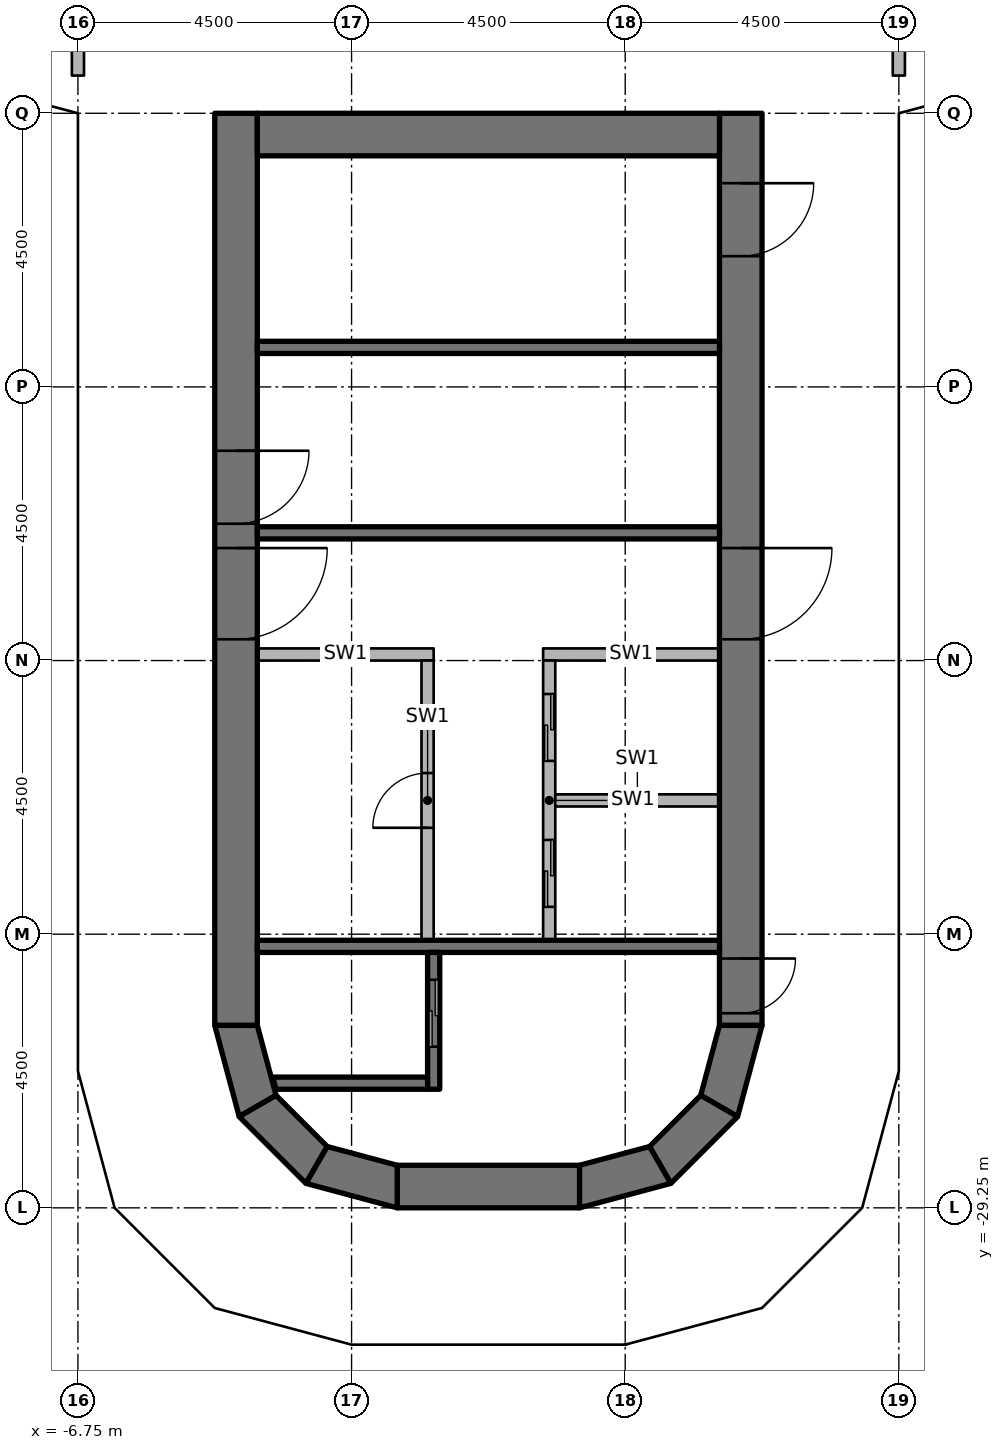
"""IFC4 building model, lengths in metres.
Left out: names, types, materials, properties, quantities, classifications, styles, units other than length and angle.
Written with IfcOpenShell. Run it as: python <this file> out.ifc"""

import sys

from ifc_helpers import new_model, si_unit, direction, frame, frame_2d, origin, origin_2d, place, context, subcontext, project, spatial, polyline, rectangle, outline, extrude, element, fill, save


model = new_model("IFC4")
c1 = context("Model", 3, precision=1e-05, world=origin(), true_north=direction((0.0, 1.0)))
c2 = subcontext(c1, "Body", "Model", "MODEL_VIEW")
j1 = project(units=[si_unit("LENGTHUNIT", "METRE"), si_unit("PLANEANGLEUNIT", "RADIAN")], contexts=[c1])
p1 = place(None, origin())
s1 = spatial("IfcSite", under=j1, at=p1, CompositionType="ELEMENT")
p2 = place(p1, origin())
s2 = spatial("IfcBuilding", under=s1, at=p2, CompositionType="ELEMENT")
p3 = place(p2, frame((0.0, 0.0, 186.6)))
s3 = spatial("IfcBuildingStorey", under=s2, at=p3, CompositionType="ELEMENT", Elevation=186.6)
for number, where, z_axis, x_axis in (
    (1, (-6.25, -26.9, 0.0), (0.0, 0.0, 1.0), (1.0, 0.0, 0.0)),
    (2, (-6.25, -24.65, 0.0), (0.0, 0.0, 1.0), (1.0, 0.0, 0.0)),
    (3, (-6.25, -20.25, 0.0), (0.0, 0.0, 1.0), (1.0, 0.0, 0.0)),
    (4, (-6.25, -15.75, 0.0), (0.0, 0.0, 1.0), (1.0, 0.0, 0.0)),
    (5, (-6.25, -10.75, 0.0), (0.0, 0.0, 1.0), (1.0, 0.0, 0.0)),
    (6, (6.25, -26.9, 0.0), (0.0, 0.0, 1.0), (1.0, 0.0, 0.0)),
    (7, (6.25, -24.65, 0.0), (0.0, 0.0, 1.0), (1.0, 0.0, 0.0)),
    (8, (6.25, -20.25, 0.0), (0.0, 0.0, 1.0), (1.0, 0.0, 0.0)),
    (9, (6.25, -15.75, 0.0), (0.0, 0.0, 1.0), (1.0, 0.0, 0.0)),
    (10, (6.25, -10.75, 0.0), (0.0, 0.0, 1.0), (1.0, 0.0, 0.0)),
):
    element("IfcColumn", number, at=place(p3, frame(where, z_axis=z_axis, x_axis=x_axis)), inside=s3, PredefinedType="COLUMN", context=c2, shape_type="SweptSolid", body=[
        extrude(rectangle(XDim=0.8, YDim=0.8, at=origin_2d()), origin(), (0.0, 0.0, 1.0), 3.65),
    ])
p4 = place(p3, frame((-4.15, -11.25, 0.0), z_axis=(0.0, 0.0, 1.0), x_axis=(0.0, -1.0, 0.0)))
e11 = element("IfcWall", 11, at=p4, inside=s3, PredefinedType="SHEAR", context=c2, shape_type="SweptSolid", body=[
    extrude(rectangle(XDim=15.0, YDim=0.7, at=frame_2d((7.5, 0.0))), origin(), (0.0, 0.0, 1.0), 3.8),
])
p5 = place(p4, frame((7.15, 0.0, 0.0)))
e12 = element("IfcOpeningElement", 12, at=p5, cuts=e11, PredefinedType="OPENING", context=c2, shape_type="SweptSolid", body=[
    extrude(rectangle(XDim=1.5, YDim=2.3, at=frame_2d((0.75, 1.15))), frame((0.0, 0.36, 0.0), z_axis=(0.0, -1.0, 0.0), x_axis=(1.0, 0.0, 0.0)), (0.0, 0.0, 1.0), 0.72),
])
p6 = place(p4, frame((5.55, 0.0, 0.0)))
e13 = element("IfcOpeningElement", 13, at=p6, cuts=e11, PredefinedType="OPENING", context=c2, shape_type="SweptSolid", body=[
    extrude(rectangle(XDim=1.2, YDim=2.1, at=frame_2d((0.6, 1.05))), frame((0.0, 0.36, 0.0), z_axis=(0.0, -1.0, 0.0), x_axis=(1.0, 0.0, 0.0)), (0.0, 0.0, 1.0), 0.72),
])
p7 = place(p3, frame((4.15, -11.25, 0.0), z_axis=(0.0, 0.0, 1.0), x_axis=(0.0, -1.0, 0.0)))
e14 = element("IfcWall", 14, at=p7, inside=s3, PredefinedType="SHEAR", context=c2, shape_type="SweptSolid", body=[
    extrude(rectangle(XDim=15.0, YDim=0.7, at=frame_2d((7.5, 0.0))), origin(), (0.0, 0.0, 1.0), 3.8),
])
p8 = place(p7, frame((7.15, 0.0, 0.0)))
e15 = element("IfcOpeningElement", 15, at=p8, cuts=e14, PredefinedType="OPENING", context=c2, shape_type="SweptSolid", body=[
    extrude(rectangle(XDim=1.5, YDim=2.3, at=frame_2d((0.75, 1.15))), frame((0.0, 0.36, 0.0), z_axis=(0.0, -1.0, 0.0), x_axis=(1.0, 0.0, 0.0)), (0.0, 0.0, 1.0), 0.72),
])
p9 = place(p7, frame((13.9, 0.0, 0.0)))
e16 = element("IfcOpeningElement", 16, at=p9, cuts=e14, PredefinedType="OPENING", context=c2, shape_type="SweptSolid", body=[
    extrude(rectangle(XDim=0.9, YDim=2.1, at=frame_2d((0.45, 1.05))), frame((0.0, 0.36, 0.0), z_axis=(0.0, -1.0, 0.0), x_axis=(1.0, 0.0, 0.0)), (0.0, 0.0, 1.0), 0.72),
])
p10 = place(p7, frame((1.15, 0.0, 0.0)))
e17 = element("IfcOpeningElement", 17, at=p10, cuts=e14, PredefinedType="OPENING", context=c2, shape_type="SweptSolid", body=[
    extrude(rectangle(XDim=1.2, YDim=2.1, at=frame_2d((0.6, 1.05))), frame((0.0, 0.36, 0.0), z_axis=(0.0, -1.0, 0.0), x_axis=(1.0, 0.0, 0.0)), (0.0, 0.0, 1.0), 0.72),
])
p11 = place(p3, frame((-3.8, -11.6, 0.0), z_axis=(0.0, 0.0, 1.0), x_axis=(1.0, 0.0, 0.0)))
e18 = element("IfcWall", 18, at=p11, inside=s3, PredefinedType="SHEAR", context=c2, shape_type="SweptSolid", body=[
    extrude(rectangle(XDim=7.6, YDim=0.7, at=frame_2d((3.8, 0.0))), origin(), (0.0, 0.0, 1.0), 3.8),
])
p12 = place(p3, frame((-1.5, -28.9, 0.0), z_axis=(0.0, 0.0, 1.0), x_axis=(1.0, 0.0, 0.0)))
e19 = element("IfcWall", 19, at=p12, inside=s3, PredefinedType="SHEAR", context=c2, shape_type="SweptSolid", body=[
    extrude(rectangle(XDim=3.0, YDim=0.7, at=frame_2d((1.5, 0.0))), origin(), (0.0, 0.0, 1.0), 3.8),
])
p13 = place(p3, origin())
e20 = element("IfcWall", 20, at=p13, inside=s3, PredefinedType="SHEAR", context=c2, shape_type="SweptSolid", body=[
    extrude(outline(polyline([(-4.5, -26.25), (-4.098, -27.75), (-3.492, -27.4), (-3.8, -26.25), (-4.5, -26.25)])), origin(), (0.0, 0.0, 1.0), 3.8),
])
p14 = place(p3, origin())
e21 = element("IfcWall", 21, at=p14, inside=s3, PredefinedType="SHEAR", context=c2, shape_type="SweptSolid", body=[
    extrude(outline(polyline([(-4.098, -27.75), (-3.0, -28.848), (-2.65, -28.242), (-3.492, -27.4), (-4.098, -27.75)])), origin(), (0.0, 0.0, 1.0), 3.8),
])
p15 = place(p3, origin())
e22 = element("IfcWall", 22, at=p15, inside=s3, PredefinedType="SHEAR", context=c2, shape_type="SweptSolid", body=[
    extrude(outline(polyline([(-3.0, -28.848), (-1.5, -29.25), (-1.5, -28.55), (-2.65, -28.242), (-3.0, -28.848)])), origin(), (0.0, 0.0, 1.0), 3.8),
])
p16 = place(p3, origin())
e23 = element("IfcWall", 23, at=p16, inside=s3, PredefinedType="SHEAR", context=c2, shape_type="SweptSolid", body=[
    extrude(outline(polyline([(4.5, -26.25), (4.098, -27.75), (3.492, -27.4), (3.8, -26.25), (4.5, -26.25)])), origin(), (0.0, 0.0, 1.0), 3.8),
])
p17 = place(p3, origin())
e24 = element("IfcWall", 24, at=p17, inside=s3, PredefinedType="SHEAR", context=c2, shape_type="SweptSolid", body=[
    extrude(outline(polyline([(4.098, -27.75), (3.0, -28.848), (2.65, -28.242), (3.492, -27.4), (4.098, -27.75)])), origin(), (0.0, 0.0, 1.0), 3.8),
])
p18 = place(p3, origin())
e25 = element("IfcWall", 25, at=p18, inside=s3, PredefinedType="SHEAR", context=c2, shape_type="SweptSolid", body=[
    extrude(outline(polyline([(3.0, -28.848), (1.5, -29.25), (1.5, -28.55), (2.65, -28.242), (3.0, -28.848)])), origin(), (0.0, 0.0, 1.0), 3.8),
])
p19 = place(p3, frame((3.8, -24.95, 0.0), z_axis=(0.0, 0.0, 1.0), x_axis=(-1.0, 0.0, 0.0)))
e26 = element("IfcWall", 26, at=p19, inside=s3, PredefinedType="SHEAR", context=c2, shape_type="SweptSolid", body=[
    extrude(rectangle(XDim=7.6, YDim=0.2, at=frame_2d((3.8, 0.0))), origin(), (0.0, 0.0, 1.0), 3.65),
])
p20 = place(p3, frame((-0.9, -27.3, 0.0), z_axis=(0.0, 0.0, 1.0), x_axis=(0.0, 1.0, 0.0)))
e27 = element("IfcWall", 27, at=p20, inside=s3, PredefinedType="SHEAR", context=c2, shape_type="SweptSolid", body=[
    extrude(rectangle(XDim=2.25, YDim=0.2, at=frame_2d((1.125, 0.0))), origin(), (0.0, 0.0, 1.0), 3.65),
])
p21 = place(p20, frame((0.7, 0.0, 0.0)))
e28 = element("IfcOpeningElement", 28, at=p21, cuts=e27, PredefinedType="OPENING", context=c2, shape_type="SweptSolid", body=[
    extrude(rectangle(XDim=1.1, YDim=2.3, at=frame_2d((0.55, 1.15))), frame((0.0, 0.11, 0.0), z_axis=(0.0, -1.0, 0.0), x_axis=(1.0, 0.0, 0.0)), (0.0, 0.0, 1.0), 0.22),
])
p22 = place(p3, origin())
e29 = element("IfcWall", 29, at=p22, inside=s3, PredefinedType="SHEAR", context=c2, shape_type="SweptSolid", body=[
    extrude(outline(polyline([(-1.0, -27.1), (-3.548, -27.1), (-3.494, -27.3), (-1.0, -27.3), (-1.0, -27.1)])), origin(), (0.0, 0.0, 1.0), 3.65),
])
for number, where, z_axis, x_axis in (
    (30, (3.8, -18.15, 0.0), (0.0, 0.0, 1.0), (-1.0, 0.0, 0.0)),
    (31, (3.8, -15.1, 0.0), (0.0, 0.0, 1.0), (-1.0, 0.0, 0.0)),
):
    element("IfcWall", number, at=place(p3, frame(where, z_axis=z_axis, x_axis=x_axis)), inside=s3, PredefinedType="SHEAR", context=c2, shape_type="SweptSolid", body=[
        extrude(rectangle(XDim=7.6, YDim=0.2, at=frame_2d((3.8, 0.0))), origin(), (0.0, 0.0, 1.0), 3.65),
    ])
p23 = place(p3, frame((3.8, -20.15, 0.0), z_axis=(0.0, 0.0, 1.0), x_axis=(-1.0, 0.0, 0.0)))
e32 = element("IfcWall", 32, at=p23, inside=s3, PredefinedType="PARTITIONING", context=c2, shape_type="SweptSolid", body=[
    extrude(rectangle(XDim=2.9, YDim=0.2, at=frame_2d((1.45, 0.0))), origin(), (0.0, 0.0, 1.0), 3.65),
])
p24 = place(p3, frame((1.0, -24.85, 0.0), z_axis=(0.0, 0.0, 1.0), x_axis=(0.0, 1.0, 0.0)))
e33 = element("IfcWall", 33, at=p24, inside=s3, PredefinedType="PARTITIONING", context=c2, shape_type="SweptSolid", body=[
    extrude(rectangle(XDim=4.6, YDim=0.2, at=frame_2d((2.3, 0.0))), origin(), (0.0, 0.0, 1.0), 3.65),
])
p25 = place(p24, frame((0.55, 0.0, 0.0)))
e34 = element("IfcOpeningElement", 34, at=p25, cuts=e33, PredefinedType="OPENING", context=c2, shape_type="SweptSolid", body=[
    extrude(rectangle(XDim=1.1, YDim=2.3, at=frame_2d((0.55, 1.15))), frame((0.0, 0.11, 0.0), z_axis=(0.0, -1.0, 0.0), x_axis=(1.0, 0.0, 0.0)), (0.0, 0.0, 1.0), 0.22),
])
p26 = place(p24, frame((2.95, 0.0, 0.0)))
e35 = element("IfcOpeningElement", 35, at=p26, cuts=e33, PredefinedType="OPENING", context=c2, shape_type="SweptSolid", body=[
    extrude(rectangle(XDim=1.1, YDim=2.3, at=frame_2d((0.55, 1.15))), frame((0.0, 0.11, 0.0), z_axis=(0.0, -1.0, 0.0), x_axis=(1.0, 0.0, 0.0)), (0.0, 0.0, 1.0), 0.22),
])
p27 = place(p3, frame((-0.9, -20.15, 0.0), z_axis=(0.0, 0.0, 1.0), x_axis=(-1.0, 0.0, 0.0)))
e36 = element("IfcWall", 36, at=p27, inside=s3, PredefinedType="PARTITIONING", context=c2, shape_type="SweptSolid", body=[
    extrude(rectangle(XDim=2.9, YDim=0.2, at=frame_2d((1.45, 0.0))), origin(), (0.0, 0.0, 1.0), 3.65),
])
p28 = place(p3, frame((-1.0, -24.85, 0.0), z_axis=(0.0, 0.0, 1.0), x_axis=(0.0, 1.0, 0.0)))
e37 = element("IfcWall", 37, at=p28, inside=s3, PredefinedType="PARTITIONING", context=c2, shape_type="SweptSolid", body=[
    extrude(rectangle(XDim=4.6, YDim=0.2, at=frame_2d((2.3, 0.0))), origin(), (0.0, 0.0, 1.0), 3.65),
])
p29 = place(p28, frame((1.85, 0.0, 0.0)))
e38 = element("IfcOpeningElement", 38, at=p29, cuts=e37, PredefinedType="OPENING", context=c2, shape_type="SweptSolid", body=[
    extrude(rectangle(XDim=0.9, YDim=2.1, at=frame_2d((0.45, 1.05))), frame((0.0, 0.11, 0.0), z_axis=(0.0, -1.0, 0.0), x_axis=(1.0, 0.0, 0.0)), (0.0, 0.0, 1.0), 0.22),
])
p30 = place(p3, frame((3.8, -22.55, 0.0), z_axis=(0.0, 0.0, 1.0), x_axis=(-1.0, 0.0, 0.0)))
e39 = element("IfcWall", 39, at=p30, inside=s3, PredefinedType="PARTITIONING", context=c2, shape_type="SweptSolid", body=[
    extrude(rectangle(XDim=2.7, YDim=0.2, at=frame_2d((1.35, 0.0))), origin(), (0.0, 0.0, 1.0), 3.65),
])
p31 = place(p3, frame((6.75, -6.85, 0.0), z_axis=(0.0, 0.0, 1.0), x_axis=(0.0, -1.0, 0.0)))
e40 = element("IfcWall", 40, at=p31, inside=s3, PredefinedType="PARTITIONING", context=c2, shape_type="SweptSolid", body=[
    extrude(rectangle(XDim=3.78, YDim=0.2, at=frame_2d((1.89, 0.0))), origin(), (0.0, 0.0, 1.0), 2.746),
])
p32 = place(p31, frame((1.44, 0.0, 0.0)))
e41 = element("IfcOpeningElement", 41, at=p32, cuts=e40, PredefinedType="OPENING", context=c2, shape_type="SweptSolid", body=[
    extrude(rectangle(XDim=0.9, YDim=2.1, at=frame_2d((0.45, 1.05))), frame((0.0, 0.11, 0.0), z_axis=(0.0, -1.0, 0.0), x_axis=(1.0, 0.0, 0.0)), (0.0, 0.0, 1.0), 0.22),
])
p33 = place(p3, frame((-6.75, -10.63, 0.0), z_axis=(0.0, 0.0, 1.0), x_axis=(0.0, 1.0, 0.0)))
e42 = element("IfcWall", 42, at=p33, inside=s3, PredefinedType="PARTITIONING", context=c2, shape_type="SweptSolid", body=[
    extrude(rectangle(XDim=3.78, YDim=0.2, at=frame_2d((1.89, 0.0))), origin(), (0.0, 0.0, 1.0), 2.746),
])
p34 = place(p8, origin())
e43 = element("IfcDoor", 43, at=p34, inside=s3, OperationType="DOUBLE_DOOR_SINGLE_SWING", PredefinedType="DOOR", context=c2, shape_type="SweptSolid", body=[
    extrude(rectangle(XDim=1.5, YDim=2.3, at=frame_2d((0.75, 1.15))), frame((0.0, 0.025, 0.0), z_axis=(0.0, -1.0, 0.0), x_axis=(1.0, 0.0, 0.0)), (0.0, 0.0, 1.0), 0.05),
])
fill(e15, e43)
p35 = place(p5, origin())
e44 = element("IfcDoor", 44, at=p35, inside=s3, OperationType="DOUBLE_DOOR_SINGLE_SWING", PredefinedType="DOOR", context=c2, shape_type="SweptSolid", body=[
    extrude(rectangle(XDim=1.5, YDim=2.3, at=frame_2d((0.75, 1.15))), frame((0.0, 0.025, 0.0), z_axis=(0.0, -1.0, 0.0), x_axis=(1.0, 0.0, 0.0)), (0.0, 0.0, 1.0), 0.05),
])
fill(e12, e44)
p36 = place(p9, origin())
e45 = element("IfcDoor", 45, at=p36, inside=s3, OperationType="SINGLE_SWING_LEFT", PredefinedType="DOOR", context=c2, shape_type="SweptSolid", body=[
    extrude(rectangle(XDim=0.9, YDim=2.1, at=frame_2d((0.45, 1.05))), frame((0.0, 0.025, 0.0), z_axis=(0.0, -1.0, 0.0), x_axis=(1.0, 0.0, 0.0)), (0.0, 0.0, 1.0), 0.05),
])
fill(e16, e45)
p37 = place(p6, origin())
e46 = element("IfcDoor", 46, at=p37, inside=s3, OperationType="SINGLE_SWING_LEFT", PredefinedType="DOOR", context=c2, shape_type="SweptSolid", body=[
    extrude(rectangle(XDim=1.2, YDim=2.1, at=frame_2d((0.6, 1.05))), frame((0.0, 0.025, 0.0), z_axis=(0.0, -1.0, 0.0), x_axis=(1.0, 0.0, 0.0)), (0.0, 0.0, 1.0), 0.05),
])
fill(e13, e46)
p38 = place(p10, origin())
e47 = element("IfcDoor", 47, at=p38, inside=s3, OperationType="SINGLE_SWING_RIGHT", PredefinedType="DOOR", context=c2, shape_type="SweptSolid", body=[
    extrude(rectangle(XDim=1.2, YDim=2.1, at=frame_2d((0.6, 1.05))), frame((0.0, 0.025, 0.0), z_axis=(0.0, -1.0, 0.0), x_axis=(1.0, 0.0, 0.0)), (0.0, 0.0, 1.0), 0.05),
])
fill(e17, e47)
p39 = place(p21, origin())
e48 = element("IfcDoor", 48, at=p39, inside=s3, OperationType="DOUBLE_DOOR_SLIDING", PredefinedType="DOOR", context=c2, shape_type="SweptSolid", body=[
    extrude(rectangle(XDim=1.1, YDim=2.3, at=frame_2d((0.55, 1.15))), frame((0.0, 0.025, 0.0), z_axis=(0.0, -1.0, 0.0), x_axis=(1.0, 0.0, 0.0)), (0.0, 0.0, 1.0), 0.05),
])
fill(e28, e48)
p40 = place(p25, origin())
e49 = element("IfcDoor", 49, at=p40, inside=s3, OperationType="DOUBLE_DOOR_SLIDING", PredefinedType="DOOR", context=c2, shape_type="SweptSolid", body=[
    extrude(rectangle(XDim=1.1, YDim=2.3, at=frame_2d((0.55, 1.15))), frame((0.0, 0.025, 0.0), z_axis=(0.0, -1.0, 0.0), x_axis=(1.0, 0.0, 0.0)), (0.0, 0.0, 1.0), 0.05),
])
fill(e34, e49)
p41 = place(p26, origin())
e50 = element("IfcDoor", 50, at=p41, inside=s3, OperationType="DOUBLE_DOOR_SLIDING", PredefinedType="DOOR", context=c2, shape_type="SweptSolid", body=[
    extrude(rectangle(XDim=1.1, YDim=2.3, at=frame_2d((0.55, 1.15))), frame((0.0, 0.025, 0.0), z_axis=(0.0, -1.0, 0.0), x_axis=(1.0, 0.0, 0.0)), (0.0, 0.0, 1.0), 0.05),
])
fill(e35, e50)
p42 = place(p29, origin())
e51 = element("IfcDoor", 51, at=p42, inside=s3, OperationType="SINGLE_SWING_RIGHT", PredefinedType="DOOR", context=c2, shape_type="SweptSolid", body=[
    extrude(rectangle(XDim=0.9, YDim=2.1, at=frame_2d((0.45, 1.05))), frame((0.0, 0.025, 0.0), z_axis=(0.0, -1.0, 0.0), x_axis=(1.0, 0.0, 0.0)), (0.0, 0.0, 1.0), 0.05),
])
fill(e38, e51)
save(model, sys.argv[1])
